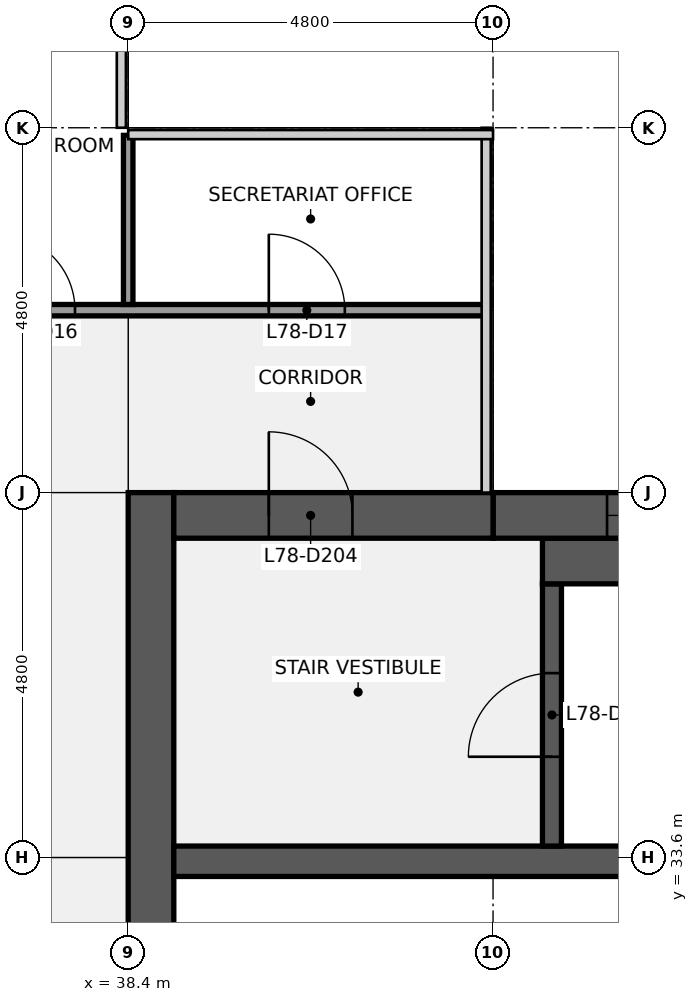
"""IFC4 building model, lengths in metres.
Left out: names, types, materials, properties, quantities, classifications, styles, units other than length and angle.
Written with IfcOpenShell. Run it as: python <this file> out.ifc"""

import sys

from ifc_helpers import new_model, si_unit, direction, frame, frame_2d, origin, place, context, subcontext, project, spatial, rectangle, extrude, element, fill, save


model = new_model("IFC4")
c1 = context("Model", 3, precision=1e-05, world=origin(), true_north=direction((0.0, 1.0)))
c2 = subcontext(c1, "Body", "Model", "MODEL_VIEW")
j1 = project(units=[si_unit("LENGTHUNIT", "METRE"), si_unit("PLANEANGLEUNIT", "RADIAN")], contexts=[c1])
p1 = place(None, origin())
s1 = spatial("IfcSite", under=j1, at=p1, CompositionType="ELEMENT")
p2 = place(p1, origin())
s2 = spatial("IfcBuilding", under=s1, at=p2, CompositionType="ELEMENT")
p3 = place(p2, frame((0.0, 0.0, 350.3)))
s3 = spatial("IfcBuildingStorey", under=s2, at=p3, CompositionType="ELEMENT", Elevation=350.3)
p4 = place(p3, frame((38.7, 9.6, 0.0), z_axis=(0.0, 0.0, 1.0), x_axis=(0.0, 1.0, 0.0)))
e1 = element("IfcWall", 1, at=p4, inside=s3, PredefinedType="SHEAR", context=c2, shape_type="SweptSolid", body=[
    extrude(rectangle(XDim=28.8, YDim=0.6, at=frame_2d((14.4, 0.0))), origin(), (0.0, 0.0, 1.0), 3.75),
])
p5 = place(p4, frame((8.7, 0.0, 0.0)))
e2 = element("IfcOpeningElement", 2, at=p5, cuts=e1, PredefinedType="OPENING", context=c2, shape_type="SweptSolid", body=[
    extrude(rectangle(XDim=1.8, YDim=2.1, at=frame_2d((0.9, 1.05))), frame((0.0, 0.31, 0.0), z_axis=(0.0, -1.0, 0.0), x_axis=(1.0, 0.0, 0.0)), (0.0, 0.0, 1.0), 0.62),
])
p6 = place(p4, frame((18.3, 0.0, 0.0)))
e3 = element("IfcOpeningElement", 3, at=p6, cuts=e1, PredefinedType="OPENING", context=c2, shape_type="SweptSolid", body=[
    extrude(rectangle(XDim=1.8, YDim=2.1, at=frame_2d((0.9, 1.05))), frame((0.0, 0.31, 0.0), z_axis=(0.0, -1.0, 0.0), x_axis=(1.0, 0.0, 0.0)), (0.0, 0.0, 1.0), 0.62),
])
p7 = place(p3, frame((39.0, 33.55, 0.0), z_axis=(0.0, 0.0, 1.0), x_axis=(1.0, 0.0, 0.0)))
e4 = element("IfcWall", 4, at=p7, inside=s3, PredefinedType="SHEAR", context=c2, shape_type="SweptSolid", body=[
    extrude(rectangle(XDim=18.0, YDim=0.4, at=frame_2d((9.0, 0.0))), origin(), (0.0, 0.0, 1.0), 3.75),
])
p8 = place(p3, frame((43.975, 33.75, 0.0), z_axis=(0.0, 0.0, 1.0), x_axis=(0.0, 1.0, 0.0)))
e5 = element("IfcWall", 5, at=p8, inside=s3, PredefinedType="SHEAR", context=c2, shape_type="SweptSolid", body=[
    extrude(rectangle(XDim=3.45, YDim=0.25, at=frame_2d((1.725, 0.0))), origin(), (0.0, 0.0, 1.0), 3.75),
])
p9 = place(p8, frame((1.175, 0.0, 0.0)))
e6 = element("IfcOpeningElement", 6, at=p9, cuts=e5, PredefinedType="OPENING", context=c2, shape_type="SweptSolid", body=[
    extrude(rectangle(XDim=1.1, YDim=2.1, at=frame_2d((0.55, 1.05))), frame((0.0, 0.135, 0.0), z_axis=(0.0, -1.0, 0.0), x_axis=(1.0, 0.0, 0.0)), (0.0, 0.0, 1.0), 0.27),
])
p10 = place(p3, frame((43.85, 37.5, 0.0), z_axis=(0.0, 0.0, 1.0), x_axis=(1.0, 0.0, 0.0)))
e7 = element("IfcWall", 7, at=p10, inside=s3, PredefinedType="SHEAR", context=c2, shape_type="SweptSolid", body=[
    extrude(rectangle(XDim=7.5, YDim=0.6, at=frame_2d((3.75, 0.0))), origin(), (0.0, 0.0, 1.0), 3.75),
])
p11 = place(p3, frame((43.2, 38.1, 0.0), z_axis=(0.0, 0.0, 1.0), x_axis=(1.0, 0.0, 0.0)))
e8 = element("IfcWall", 8, at=p11, inside=s3, PredefinedType="SHEAR", context=c2, shape_type="SweptSolid", body=[
    extrude(rectangle(XDim=13.8, YDim=0.6, at=frame_2d((6.9, 0.0))), origin(), (0.0, 0.0, 1.0), 3.75),
])
p12 = place(p11, frame((6.3, 0.0, 0.9)))
e9 = element("IfcOpeningElement", 9, at=p12, cuts=e8, PredefinedType="OPENING", context=c2, shape_type="SweptSolid", body=[
    extrude(rectangle(XDim=1.8, YDim=1.5, at=frame_2d((0.9, 0.75))), frame((0.0, 0.31, 0.0), z_axis=(0.0, -1.0, 0.0), x_axis=(1.0, 0.0, 0.0)), (0.0, 0.0, 1.0), 0.62),
])
p13 = place(p11, frame((1.5, 0.0, 0.9)))
e10 = element("IfcOpeningElement", 10, at=p13, cuts=e8, PredefinedType="OPENING", context=c2, shape_type="SweptSolid", body=[
    extrude(rectangle(XDim=1.8, YDim=1.5, at=frame_2d((0.9, 0.75))), frame((0.0, 0.31, 0.0), z_axis=(0.0, -1.0, 0.0), x_axis=(1.0, 0.0, 0.0)), (0.0, 0.0, 1.0), 0.62),
])
p14 = place(p3, frame((39.0, 38.1, 0.0), z_axis=(0.0, 0.0, 1.0), x_axis=(1.0, 0.0, 0.0)))
e11 = element("IfcWall", 11, at=p14, inside=s3, PredefinedType="SHEAR", context=c2, shape_type="SweptSolid", body=[
    extrude(rectangle(XDim=4.2, YDim=0.6, at=frame_2d((2.1, 0.0))), origin(), (0.0, 0.0, 1.0), 3.75),
])
p15 = place(p14, frame((1.25, 0.0, 0.0)))
e12 = element("IfcOpeningElement", 12, at=p15, cuts=e11, PredefinedType="OPENING", context=c2, shape_type="SweptSolid", body=[
    extrude(rectangle(XDim=1.1, YDim=2.1, at=frame_2d((0.55, 1.05))), frame((0.0, 0.31, 0.0), z_axis=(0.0, -1.0, 0.0), x_axis=(1.0, 0.0, 0.0)), (0.0, 0.0, 1.0), 0.62),
])
p16 = place(p3, frame((14.5, 40.8, 0.0), z_axis=(0.0, 0.0, 1.0), x_axis=(1.0, 0.0, 0.0)))
e13 = element("IfcWall", 13, at=p16, inside=s3, PredefinedType="PARTITIONING", context=c2, shape_type="SweptSolid", body=[
    extrude(rectangle(XDim=28.6, YDim=0.15, at=frame_2d((14.3, 0.0))), origin(), (0.0, 0.0, 1.0), 2.759),
])
p17 = place(p16, frame((1.85, 0.0, 0.0)))
e14 = element("IfcOpeningElement", 14, at=p17, cuts=e13, PredefinedType="OPENING", context=c2, shape_type="SweptSolid", body=[
    extrude(rectangle(XDim=1.0, YDim=2.1, at=frame_2d((0.5, 1.05))), frame((0.0, 0.085, 0.0), z_axis=(0.0, -1.0, 0.0), x_axis=(1.0, 0.0, 0.0)), (0.0, 0.0, 1.0), 0.17),
])
p18 = place(p16, frame((7.8, 0.0, 0.0)))
e15 = element("IfcOpeningElement", 15, at=p18, cuts=e13, PredefinedType="OPENING", context=c2, shape_type="SweptSolid", body=[
    extrude(rectangle(XDim=1.0, YDim=2.1, at=frame_2d((0.5, 1.05))), frame((0.0, 0.085, 0.0), z_axis=(0.0, -1.0, 0.0), x_axis=(1.0, 0.0, 0.0)), (0.0, 0.0, 1.0), 0.17),
])
p19 = place(p16, frame((12.6, 0.0, 0.0)))
e16 = element("IfcOpeningElement", 16, at=p19, cuts=e13, PredefinedType="OPENING", context=c2, shape_type="SweptSolid", body=[
    extrude(rectangle(XDim=1.0, YDim=2.1, at=frame_2d((0.5, 1.05))), frame((0.0, 0.085, 0.0), z_axis=(0.0, -1.0, 0.0), x_axis=(1.0, 0.0, 0.0)), (0.0, 0.0, 1.0), 0.17),
])
p20 = place(p16, frame((15.0, 0.0, 0.0)))
e17 = element("IfcOpeningElement", 17, at=p20, cuts=e13, PredefinedType="OPENING", context=c2, shape_type="SweptSolid", body=[
    extrude(rectangle(XDim=1.0, YDim=2.1, at=frame_2d((0.5, 1.05))), frame((0.0, 0.085, 0.0), z_axis=(0.0, -1.0, 0.0), x_axis=(1.0, 0.0, 0.0)), (0.0, 0.0, 1.0), 0.17),
])
p21 = place(p16, frame((18.6, 0.0, 0.0)))
e18 = element("IfcOpeningElement", 18, at=p21, cuts=e13, PredefinedType="OPENING", context=c2, shape_type="SweptSolid", body=[
    extrude(rectangle(XDim=1.0, YDim=2.1, at=frame_2d((0.5, 1.05))), frame((0.0, 0.085, 0.0), z_axis=(0.0, -1.0, 0.0), x_axis=(1.0, 0.0, 0.0)), (0.0, 0.0, 1.0), 0.17),
])
p22 = place(p16, frame((22.2, 0.0, 0.0)))
e19 = element("IfcOpeningElement", 19, at=p22, cuts=e13, PredefinedType="OPENING", context=c2, shape_type="SweptSolid", body=[
    extrude(rectangle(XDim=1.0, YDim=2.1, at=frame_2d((0.5, 1.05))), frame((0.0, 0.085, 0.0), z_axis=(0.0, -1.0, 0.0), x_axis=(1.0, 0.0, 0.0)), (0.0, 0.0, 1.0), 0.17),
])
p23 = place(p16, frame((25.75, 0.0, 0.0)))
e20 = element("IfcOpeningElement", 20, at=p23, cuts=e13, PredefinedType="OPENING", context=c2, shape_type="SweptSolid", body=[
    extrude(rectangle(XDim=1.0, YDim=2.1, at=frame_2d((0.5, 1.05))), frame((0.0, 0.085, 0.0), z_axis=(0.0, -1.0, 0.0), x_axis=(1.0, 0.0, 0.0)), (0.0, 0.0, 1.0), 0.17),
])
p24 = place(p3, frame((38.4, 40.875, 0.0), z_axis=(0.0, 0.0, 1.0), x_axis=(0.0, 1.0, 0.0)))
e21 = element("IfcWall", 21, at=p24, inside=s3, PredefinedType="PARTITIONING", context=c2, shape_type="SweptSolid", body=[
    extrude(rectangle(XDim=2.225, YDim=0.125, at=frame_2d((1.113, 0.0))), origin(), (0.0, 0.0, 1.0), 2.759),
])
p25 = place(p9, origin())
e22 = element("IfcDoor", 22, at=p25, inside=s3, OperationType="SINGLE_SWING_LEFT", PredefinedType="DOOR", context=c2, shape_type="SweptSolid", body=[
    extrude(rectangle(XDim=1.1, YDim=2.1, at=frame_2d((0.55, 1.05))), frame((0.0, 0.025, 0.0), z_axis=(0.0, -1.0, 0.0), x_axis=(1.0, 0.0, 0.0)), (0.0, 0.0, 1.0), 0.05),
])
fill(e6, e22)
p26 = place(p15, origin())
e23 = element("IfcDoor", 23, at=p26, inside=s3, OperationType="SINGLE_SWING_LEFT", PredefinedType="DOOR", context=c2, shape_type="SweptSolid", body=[
    extrude(rectangle(XDim=1.1, YDim=2.1, at=frame_2d((0.55, 1.05))), frame((0.0, 0.025, 0.0), z_axis=(0.0, -1.0, 0.0), x_axis=(1.0, 0.0, 0.0)), (0.0, 0.0, 1.0), 0.05),
])
fill(e12, e23)
p27 = place(p13, origin())
e24 = element("IfcWindow", 24, at=p27, inside=s3, PartitioningType="SINGLE_PANEL", PredefinedType="WINDOW", context=c2, shape_type="SweptSolid", body=[
    extrude(rectangle(XDim=1.8, YDim=1.5, at=frame_2d((0.9, 0.75))), frame((0.0, 0.03, 0.0), z_axis=(0.0, -1.0, 0.0), x_axis=(1.0, 0.0, 0.0)), (0.0, 0.0, 1.0), 0.06),
])
fill(e10, e24)
p28 = place(p22, origin())
e25 = element("IfcDoor", 25, at=p28, inside=s3, OperationType="SINGLE_SWING_LEFT", PredefinedType="DOOR", context=c2, shape_type="SweptSolid", body=[
    extrude(rectangle(XDim=1.0, YDim=2.1, at=frame_2d((0.5, 1.05))), frame((0.0, 0.025, 0.0), z_axis=(0.0, -1.0, 0.0), x_axis=(1.0, 0.0, 0.0)), (0.0, 0.0, 1.0), 0.05),
])
fill(e19, e25)
p29 = place(p23, origin())
e26 = element("IfcDoor", 26, at=p29, inside=s3, OperationType="SINGLE_SWING_LEFT", PredefinedType="DOOR", context=c2, shape_type="SweptSolid", body=[
    extrude(rectangle(XDim=1.0, YDim=2.1, at=frame_2d((0.5, 1.05))), frame((0.0, 0.025, 0.0), z_axis=(0.0, -1.0, 0.0), x_axis=(1.0, 0.0, 0.0)), (0.0, 0.0, 1.0), 0.05),
])
fill(e20, e26)
save(model, sys.argv[1])
